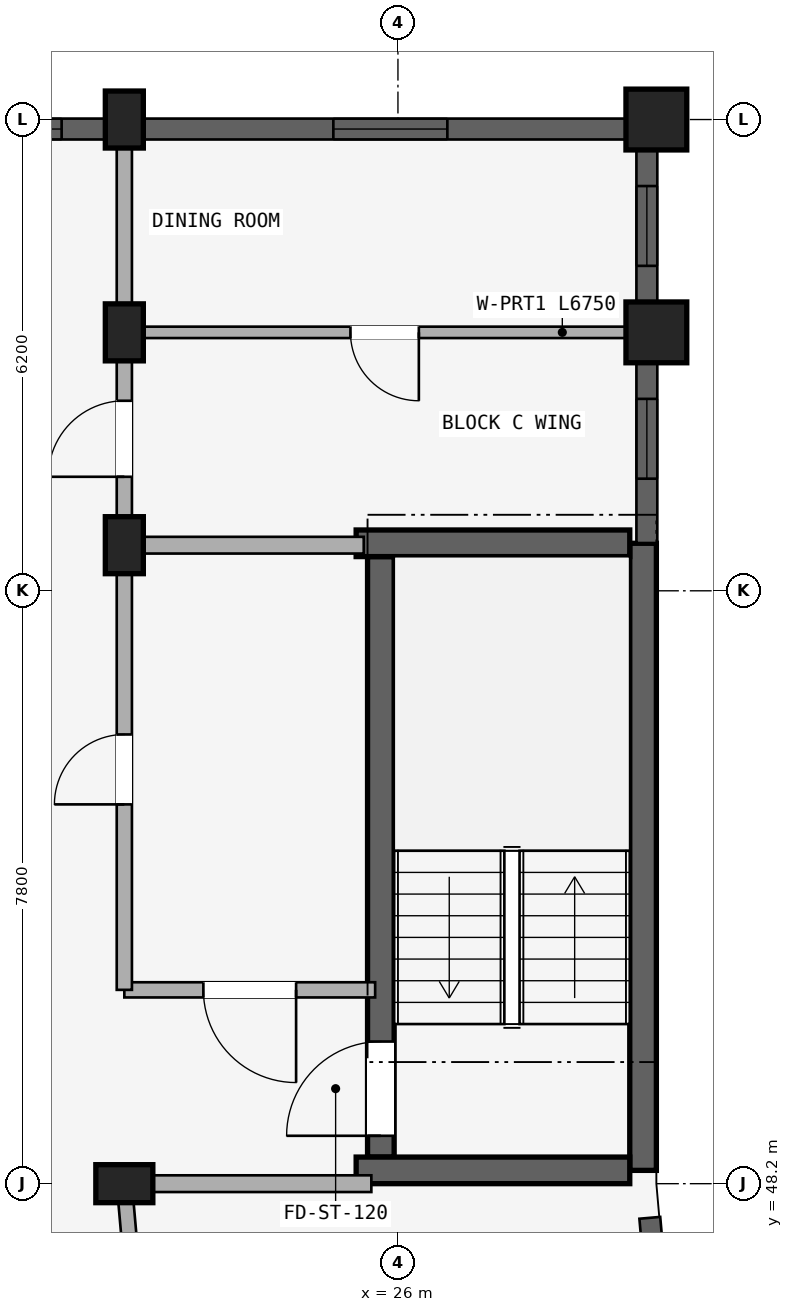
"""IFC4 building model, lengths in metres.
Left out: names, types, materials, properties, quantities, classifications, styles, units other than length and angle.
Written with IfcOpenShell. Run it as: python <this file> out.ifc"""

import sys

from ifc_helpers import new_model, si_unit, direction, frame, frame_2d, origin, origin_2d, place, context, subcontext, project, spatial, rectangle, extrude, element, fill, save


model = new_model("IFC4")
c1 = context("Model", 3, precision=1e-05, world=origin(), true_north=direction((0.0, 1.0)))
c2 = subcontext(c1, "Body", "Model", "MODEL_VIEW")
j1 = project(units=[si_unit("LENGTHUNIT", "METRE"), si_unit("PLANEANGLEUNIT", "RADIAN")], contexts=[c1])
p1 = place(None, origin())
s1 = spatial("IfcSite", under=j1, at=p1, CompositionType="ELEMENT")
p2 = place(p1, origin())
s2 = spatial("IfcBuilding", under=s1, at=p2, CompositionType="ELEMENT")
p3 = place(p2, frame((0.0, 0.0, 8.7)))
s3 = spatial("IfcBuildingStorey", under=s2, at=p3, CompositionType="ELEMENT", Elevation=8.7)
p4 = place(p3, frame((29.225, 48.375, 0.0), z_axis=(0.0, 0.0, 1.0), x_axis=(0.0, 1.0, 0.0)))
e1 = element("IfcWall", 1, at=p4, inside=s3, PredefinedType="SHEAR", context=c2, shape_type="SweptSolid", body=[
    extrude(rectangle(XDim=8.25, YDim=0.35, at=frame_2d((4.125, 0.0))), origin(), (0.0, 0.0, 1.0), 2.93),
])
p5 = place(p3, frame((25.775, 48.55, 0.0), z_axis=(0.0, 0.0, 1.0), x_axis=(0.0, 1.0, 0.0)))
e2 = element("IfcWall", 2, at=p5, inside=s3, PredefinedType="SHEAR", context=c2, shape_type="SweptSolid", body=[
    extrude(rectangle(XDim=7.9, YDim=0.35, at=frame_2d((3.95, 0.0))), origin(), (0.0, 0.0, 1.0), 2.93),
])
p6 = place(p5, frame((0.28, 0.0, 0.0)))
e3 = element("IfcOpeningElement", 3, at=p6, cuts=e2, PredefinedType="OPENING", context=c2, shape_type="SweptSolid", body=[
    extrude(rectangle(XDim=1.24, YDim=2.15, at=frame_2d((0.62, 1.075))), frame((0.0, 0.185, 0.0), z_axis=(0.0, -1.0, 0.0), x_axis=(1.0, 0.0, 0.0)), (0.0, 0.0, 1.0), 0.37),
])
for number, where, z_axis, x_axis in (
    (4, (29.05, 48.375, 0.0), (0.0, 0.0, 1.0), (-1.0, 0.0, 0.0)),
    (5, (29.05, 56.625, 0.0), (0.0, 0.0, 1.0), (-1.0, 0.0, 0.0)),
):
    element("IfcWall", number, at=place(p3, frame(where, z_axis=z_axis, x_axis=x_axis)), inside=s3, PredefinedType="SHEAR", context=c2, shape_type="SweptSolid", body=[
        extrude(rectangle(XDim=3.6, YDim=0.35, at=frame_2d((1.8, 0.0))), origin(), (0.0, 0.0, 1.0), 2.93),
    ])
for number, where, z_axis, x_axis in (
    (6, (22.4, 48.2, 0.0), (0.0, 0.0, 1.0), (0.0, 1.0, 0.0)),
    (7, (22.4, 56.6, 0.0), (0.0, 0.0, 1.0), (1.0, 0.0, 0.0)),
):
    element("IfcColumn", number, at=place(p3, frame(where, z_axis=z_axis, x_axis=x_axis)), inside=s3, PredefinedType="COLUMN", context=c2, shape_type="SweptSolid", body=[
        extrude(rectangle(XDim=0.5, YDim=0.75, at=origin_2d()), origin(), (0.0, 0.0, 1.0), 2.93),
    ])
p7 = place(p3, frame((29.4, 59.4, 0.0), z_axis=(0.0, 0.0, 1.0), x_axis=(1.0, 0.0, 0.0)))
e8 = element("IfcColumn", 8, at=p7, inside=s3, PredefinedType="COLUMN", context=c2, shape_type="SweptSolid", body=[
    extrude(rectangle(XDim=0.8, YDim=0.8, at=origin_2d()), origin(), (0.0, 0.0, 1.0), 2.93),
])
p8 = place(p3, frame((22.4, 59.4, 0.0), z_axis=(0.0, 0.0, 1.0), x_axis=(1.0, 0.0, 0.0)))
e9 = element("IfcColumn", 9, at=p8, inside=s3, PredefinedType="COLUMN", context=c2, shape_type="SweptSolid", body=[
    extrude(rectangle(XDim=0.5, YDim=0.75, at=origin_2d()), origin(), (0.0, 0.0, 1.0), 2.93),
])
p9 = place(p3, frame((29.4, 62.2, 0.0), z_axis=(0.0, 0.0, 1.0), x_axis=(1.0, 0.0, 0.0)))
e10 = element("IfcColumn", 10, at=p9, inside=s3, PredefinedType="COLUMN", context=c2, shape_type="SweptSolid", body=[
    extrude(rectangle(XDim=0.8, YDim=0.8, at=origin_2d()), origin(), (0.0, 0.0, 1.0), 2.93),
])
p10 = place(p3, frame((22.4, 62.2, 0.0), z_axis=(0.0, 0.0, 1.0), x_axis=(1.0, 0.0, 0.0)))
e11 = element("IfcColumn", 11, at=p10, inside=s3, PredefinedType="COLUMN", context=c2, shape_type="SweptSolid", body=[
    extrude(rectangle(XDim=0.5, YDim=0.75, at=origin_2d()), origin(), (0.0, 0.0, 1.0), 2.93),
])
p11 = place(p3, frame((25.7, 50.75, 0.0), z_axis=(0.0, 0.0, 1.0), x_axis=(-1.0, 0.0, 0.0)))
e12 = element("IfcWall", 12, at=p11, inside=s3, PredefinedType="STANDARD", context=c2, shape_type="SweptSolid", body=[
    extrude(rectangle(XDim=3.3, YDim=0.2, at=frame_2d((1.65, 0.0))), origin(), (0.0, 0.0, 1.0), 2.372),
])
p12 = place(p11, frame((1.04, 0.0, 0.0)))
e13 = element("IfcOpeningElement", 13, at=p12, cuts=e12, PredefinedType="OPENING", context=c2, shape_type="SweptSolid", body=[
    extrude(rectangle(XDim=1.22, YDim=2.15, at=frame_2d((0.61, 1.075))), frame((0.0, 0.11, 0.0), z_axis=(0.0, -1.0, 0.0), x_axis=(1.0, 0.0, 0.0)), (0.0, 0.0, 1.0), 0.22),
])
p13 = place(p3, frame((22.4, 50.75, 0.0), z_axis=(0.0, 0.0, 1.0), x_axis=(0.0, 1.0, 0.0)))
e14 = element("IfcWall", 14, at=p13, inside=s3, PredefinedType="STANDARD", context=c2, shape_type="SweptSolid", body=[
    extrude(rectangle(XDim=5.8, YDim=0.2, at=frame_2d((2.9, 0.0))), origin(), (0.0, 0.0, 1.0), 2.372),
])
p14 = place(p13, frame((2.44, 0.0, 0.0)))
e15 = element("IfcOpeningElement", 15, at=p14, cuts=e14, PredefinedType="OPENING", context=c2, shape_type="SweptSolid", body=[
    extrude(rectangle(XDim=0.92, YDim=2.1, at=frame_2d((0.46, 1.05))), frame((0.0, 0.11, 0.0), z_axis=(0.0, -1.0, 0.0), x_axis=(1.0, 0.0, 0.0)), (0.0, 0.0, 1.0), 0.22),
])
p15 = place(p3, frame((22.792, 43.72, 0.0), z_axis=(0.0, 0.0, 1.0), x_axis=(-0.087187153726, 0.996191949488, 0.0)))
e16 = element("IfcWall", 16, at=p15, inside=s3, PredefinedType="STANDARD", context=c2, shape_type="SweptSolid", body=[
    extrude(rectangle(XDim=4.497, YDim=0.2, at=frame_2d((2.249, 0.0))), origin(), (0.0, 0.0, 1.0), 2.372),
])
p16 = place(p3, frame((25.65, 48.2, 0.0), z_axis=(0.0, 0.0, 1.0), x_axis=(-1.0, 0.0, 0.0)))
e17 = element("IfcWall", 17, at=p16, inside=s3, PredefinedType="STANDARD", context=c2, shape_type="SweptSolid", body=[
    extrude(rectangle(XDim=3.2, YDim=0.22, at=frame_2d((1.6, 0.0))), origin(), (0.0, 0.0, 1.0), 2.372),
])
p17 = place(p3, frame((22.4, 56.6, 0.0), z_axis=(0.0, 0.0, 1.0), x_axis=(0.0, 1.0, 0.0)))
e18 = element("IfcWall", 18, at=p17, inside=s3, PredefinedType="STANDARD", context=c2, shape_type="SweptSolid", body=[
    extrude(rectangle(XDim=2.8, YDim=0.2, at=frame_2d((1.4, 0.0))), origin(), (0.0, 0.0, 1.0), 2.372),
])
p18 = place(p17, frame((0.9, 0.0, 0.0)))
e19 = element("IfcOpeningElement", 19, at=p18, cuts=e18, PredefinedType="OPENING", context=c2, shape_type="SweptSolid", body=[
    extrude(rectangle(XDim=1.0, YDim=2.15, at=frame_2d((0.5, 1.075))), frame((0.0, 0.11, 0.0), z_axis=(0.0, -1.0, 0.0), x_axis=(1.0, 0.0, 0.0)), (0.0, 0.0, 1.0), 0.22),
])
p19 = place(p3, frame((25.55, 56.6, 0.0), z_axis=(0.0, 0.0, 1.0), x_axis=(-1.0, 0.0, 0.0)))
e20 = element("IfcWall", 20, at=p19, inside=s3, PredefinedType="STANDARD", context=c2, shape_type="SweptSolid", body=[
    extrude(rectangle(XDim=3.1, YDim=0.22, at=frame_2d((1.55, 0.0))), origin(), (0.0, 0.0, 1.0), 2.372),
])
p20 = place(p3, frame((22.4, 59.4, 0.0), z_axis=(0.0, 0.0, 1.0), x_axis=(0.0, 1.0, 0.0)))
e21 = element("IfcWall", 21, at=p20, inside=s3, PredefinedType="STANDARD", context=c2, shape_type="SweptSolid", body=[
    extrude(rectangle(XDim=2.8, YDim=0.2, at=frame_2d((1.4, 0.0))), origin(), (0.0, 0.0, 1.0), 2.372),
])
p21 = place(p3, frame((29.2, 59.4, 0.0), z_axis=(0.0, 0.0, 1.0), x_axis=(-1.0, 0.0, 0.0)))
e22 = element("IfcWall", 22, at=p21, inside=s3, PredefinedType="PARTITIONING", context=c2, shape_type="SweptSolid", body=[
    extrude(rectangle(XDim=6.75, YDim=0.15, at=frame_2d((3.375, 0.0))), origin(), (0.0, 0.0, 1.0), 2.372),
])
p22 = place(p21, frame((2.925, 0.0, 0.0)))
e23 = element("IfcOpeningElement", 23, at=p22, cuts=e22, PredefinedType="OPENING", context=c2, shape_type="SweptSolid", body=[
    extrude(rectangle(XDim=0.9, YDim=2.1, at=frame_2d((0.45, 1.05))), frame((0.0, 0.085, 0.0), z_axis=(0.0, -1.0, 0.0), x_axis=(1.0, 0.0, 0.0)), (0.0, 0.0, 1.0), 0.17),
])
p23 = place(p3, frame((29.537, 45.203, 0.0), z_axis=(0.0, 0.0, 1.0), x_axis=(-0.08716102895, 0.996194235595, 0.0)))
e24 = element("IfcWall", 24, at=p23, inside=s3, PredefinedType="STANDARD", context=c2, shape_type="SweptSolid", body=[
    extrude(rectangle(XDim=2.557, YDim=0.275, at=frame_2d((1.279, 0.0))), origin(), (0.0, 0.0, 1.0), 2.472),
])
p24 = place(p23, frame((0.609, 0.0, 0.622)))
e25 = element("IfcOpeningElement", 25, at=p24, cuts=e24, PredefinedType="OPENING", context=c2, shape_type="SweptSolid", body=[
    extrude(rectangle(XDim=1.5, YDim=1.65, at=frame_2d((0.75, 0.825))), frame((0.0, 0.147, 0.0), z_axis=(0.0, -1.0, 0.0), x_axis=(1.0, 0.0, 0.0)), (0.0, 0.0, 1.0), 0.295),
])
p25 = place(p3, frame((29.275, 56.628, 0.0), z_axis=(0.0, 0.0, 1.0), x_axis=(0.0, 1.0, 0.0)))
e26 = element("IfcWall", 26, at=p25, inside=s3, PredefinedType="STANDARD", context=c2, shape_type="SweptSolid", body=[
    extrude(rectangle(XDim=2.368, YDim=0.275, at=frame_2d((1.184, 0.0))), origin(), (0.0, 0.0, 1.0), 2.472),
])
p26 = place(p25, frame((0.846, 0.0, 0.88)))
e27 = element("IfcOpeningElement", 27, at=p26, cuts=e26, PredefinedType="OPENING", context=c2, shape_type="SweptSolid", body=[
    extrude(rectangle(XDim=1.05, YDim=1.25, at=frame_2d((0.525, 0.625))), frame((0.0, 0.147, 0.0), z_axis=(0.0, -1.0, 0.0), x_axis=(1.0, 0.0, 0.0)), (0.0, 0.0, 1.0), 0.295),
])
p27 = place(p3, frame((29.275, 59.803, 0.0), z_axis=(0.0, 0.0, 1.0), x_axis=(0.0, 1.0, 0.0)))
e28 = element("IfcWall", 28, at=p27, inside=s3, PredefinedType="STANDARD", context=c2, shape_type="SweptSolid", body=[
    extrude(rectangle(XDim=1.993, YDim=0.275, at=frame_2d((0.997, 0.0))), origin(), (0.0, 0.0, 1.0), 2.472),
])
p28 = place(p27, frame((0.471, 0.0, 0.88)))
e29 = element("IfcOpeningElement", 29, at=p28, cuts=e28, PredefinedType="OPENING", context=c2, shape_type="SweptSolid", body=[
    extrude(rectangle(XDim=1.05, YDim=1.25, at=frame_2d((0.525, 0.625))), frame((0.0, 0.147, 0.0), z_axis=(0.0, -1.0, 0.0), x_axis=(1.0, 0.0, 0.0)), (0.0, 0.0, 1.0), 0.295),
])
p29 = place(p3, frame((28.997, 62.075, 0.0), z_axis=(0.0, 0.0, 1.0), x_axis=(-1.0, 0.0, 0.0)))
e30 = element("IfcWall", 30, at=p29, inside=s3, PredefinedType="STANDARD", context=c2, shape_type="SweptSolid", body=[
    extrude(rectangle(XDim=6.343, YDim=0.275, at=frame_2d((3.171, 0.0))), origin(), (0.0, 0.0, 1.0), 2.372),
])
p30 = place(p29, frame((2.346, 0.0, 0.522)))
e31 = element("IfcOpeningElement", 31, at=p30, cuts=e30, PredefinedType="OPENING", context=c2, shape_type="SweptSolid", body=[
    extrude(rectangle(XDim=1.5, YDim=1.65, at=frame_2d((0.75, 0.825))), frame((0.0, 0.147, 0.0), z_axis=(0.0, -1.0, 0.0), x_axis=(1.0, 0.0, 0.0)), (0.0, 0.0, 1.0), 0.295),
])
p31 = place(p3, frame((22.146, 62.075, 0.0), z_axis=(0.0, 0.0, 1.0), x_axis=(-1.0, 0.0, 0.0)))
e32 = element("IfcWall", 32, at=p31, inside=s3, PredefinedType="STANDARD", context=c2, shape_type="SweptSolid", body=[
    extrude(rectangle(XDim=1.893, YDim=0.275, at=frame_2d((0.947, 0.0))), origin(), (0.0, 0.0, 1.0), 2.372),
])
p32 = place(p31, frame((0.572, 0.0, 0.88)))
e33 = element("IfcOpeningElement", 33, at=p32, cuts=e32, PredefinedType="OPENING", context=c2, shape_type="SweptSolid", body=[
    extrude(rectangle(XDim=0.75, YDim=1.05, at=frame_2d((0.375, 0.525))), frame((0.0, 0.147, 0.0), z_axis=(0.0, -1.0, 0.0), x_axis=(1.0, 0.0, 0.0)), (0.0, 0.0, 1.0), 0.295),
])
p33 = place(p26, origin())
e34 = element("IfcWindow", 34, at=p33, inside=s3, PartitioningType="SINGLE_PANEL", PredefinedType="WINDOW", context=c2, shape_type="SweptSolid", body=[
    extrude(rectangle(XDim=1.05, YDim=1.25, at=frame_2d((0.525, 0.625))), frame((0.0, 0.03, 0.0), z_axis=(0.0, -1.0, 0.0), x_axis=(1.0, 0.0, 0.0)), (0.0, 0.0, 1.0), 0.06),
])
fill(e27, e34)
p34 = place(p28, origin())
e35 = element("IfcWindow", 35, at=p34, inside=s3, PartitioningType="SINGLE_PANEL", PredefinedType="WINDOW", context=c2, shape_type="SweptSolid", body=[
    extrude(rectangle(XDim=1.05, YDim=1.25, at=frame_2d((0.525, 0.625))), frame((0.0, 0.03, 0.0), z_axis=(0.0, -1.0, 0.0), x_axis=(1.0, 0.0, 0.0)), (0.0, 0.0, 1.0), 0.06),
])
fill(e29, e35)
p35 = place(p30, origin())
e36 = element("IfcWindow", 36, at=p35, inside=s3, PartitioningType="DOUBLE_PANEL_VERTICAL", PredefinedType="WINDOW", context=c2, shape_type="SweptSolid", body=[
    extrude(rectangle(XDim=1.5, YDim=1.65, at=frame_2d((0.75, 0.825))), frame((0.0, 0.03, 0.0), z_axis=(0.0, -1.0, 0.0), x_axis=(1.0, 0.0, 0.0)), (0.0, 0.0, 1.0), 0.06),
])
fill(e31, e36)
p36 = place(p32, origin())
e37 = element("IfcWindow", 37, at=p36, inside=s3, PartitioningType="SINGLE_PANEL", PredefinedType="WINDOW", context=c2, shape_type="SweptSolid", body=[
    extrude(rectangle(XDim=0.75, YDim=1.05, at=frame_2d((0.375, 0.525))), frame((0.0, 0.03, 0.0), z_axis=(0.0, -1.0, 0.0), x_axis=(1.0, 0.0, 0.0)), (0.0, 0.0, 1.0), 0.06),
])
fill(e33, e37)
p37 = place(p6, frame((1.24, 0.0, 0.0), z_axis=(0.0, 0.0, 1.0), x_axis=(-1.0, 0.0, 0.0)))
e38 = element("IfcDoor", 38, at=p37, inside=s3, OperationType="SINGLE_SWING_RIGHT", PredefinedType="DOOR", context=c2, shape_type="SweptSolid", body=[
    extrude(rectangle(XDim=1.24, YDim=2.15, at=frame_2d((0.62, 1.075))), frame((0.0, 0.025, 0.0), z_axis=(0.0, -1.0, 0.0), x_axis=(1.0, 0.0, 0.0)), (0.0, 0.0, 1.0), 0.05),
])
fill(e3, e38)
p38 = place(p12, frame((1.22, 0.0, 0.0), z_axis=(0.0, 0.0, 1.0), x_axis=(-1.0, 0.0, 0.0)))
e39 = element("IfcDoor", 39, at=p38, inside=s3, OperationType="SINGLE_SWING_RIGHT", PredefinedType="DOOR", context=c2, shape_type="SweptSolid", body=[
    extrude(rectangle(XDim=1.22, YDim=2.15, at=frame_2d((0.61, 1.075))), frame((0.0, 0.025, 0.0), z_axis=(0.0, -1.0, 0.0), x_axis=(1.0, 0.0, 0.0)), (0.0, 0.0, 1.0), 0.05),
])
fill(e13, e39)
p39 = place(p14, origin())
e40 = element("IfcDoor", 40, at=p39, inside=s3, OperationType="SINGLE_SWING_LEFT", PredefinedType="DOOR", context=c2, shape_type="SweptSolid", body=[
    extrude(rectangle(XDim=0.92, YDim=2.1, at=frame_2d((0.46, 1.05))), frame((0.0, 0.025, 0.0), z_axis=(0.0, -1.0, 0.0), x_axis=(1.0, 0.0, 0.0)), (0.0, 0.0, 1.0), 0.05),
])
fill(e15, e40)
p40 = place(p18, origin())
e41 = element("IfcDoor", 41, at=p40, inside=s3, OperationType="SINGLE_SWING_LEFT", PredefinedType="DOOR", context=c2, shape_type="SweptSolid", body=[
    extrude(rectangle(XDim=1.0, YDim=2.15, at=frame_2d((0.5, 1.075))), frame((0.0, 0.025, 0.0), z_axis=(0.0, -1.0, 0.0), x_axis=(1.0, 0.0, 0.0)), (0.0, 0.0, 1.0), 0.05),
])
fill(e19, e41)
p41 = place(p22, origin())
e42 = element("IfcDoor", 42, at=p41, inside=s3, OperationType="SINGLE_SWING_LEFT", PredefinedType="DOOR", context=c2, shape_type="SweptSolid", body=[
    extrude(rectangle(XDim=0.9, YDim=2.1, at=frame_2d((0.45, 1.05))), frame((0.0, 0.025, 0.0), z_axis=(0.0, -1.0, 0.0), x_axis=(1.0, 0.0, 0.0)), (0.0, 0.0, 1.0), 0.05),
])
fill(e23, e42)
save(model, sys.argv[1])
